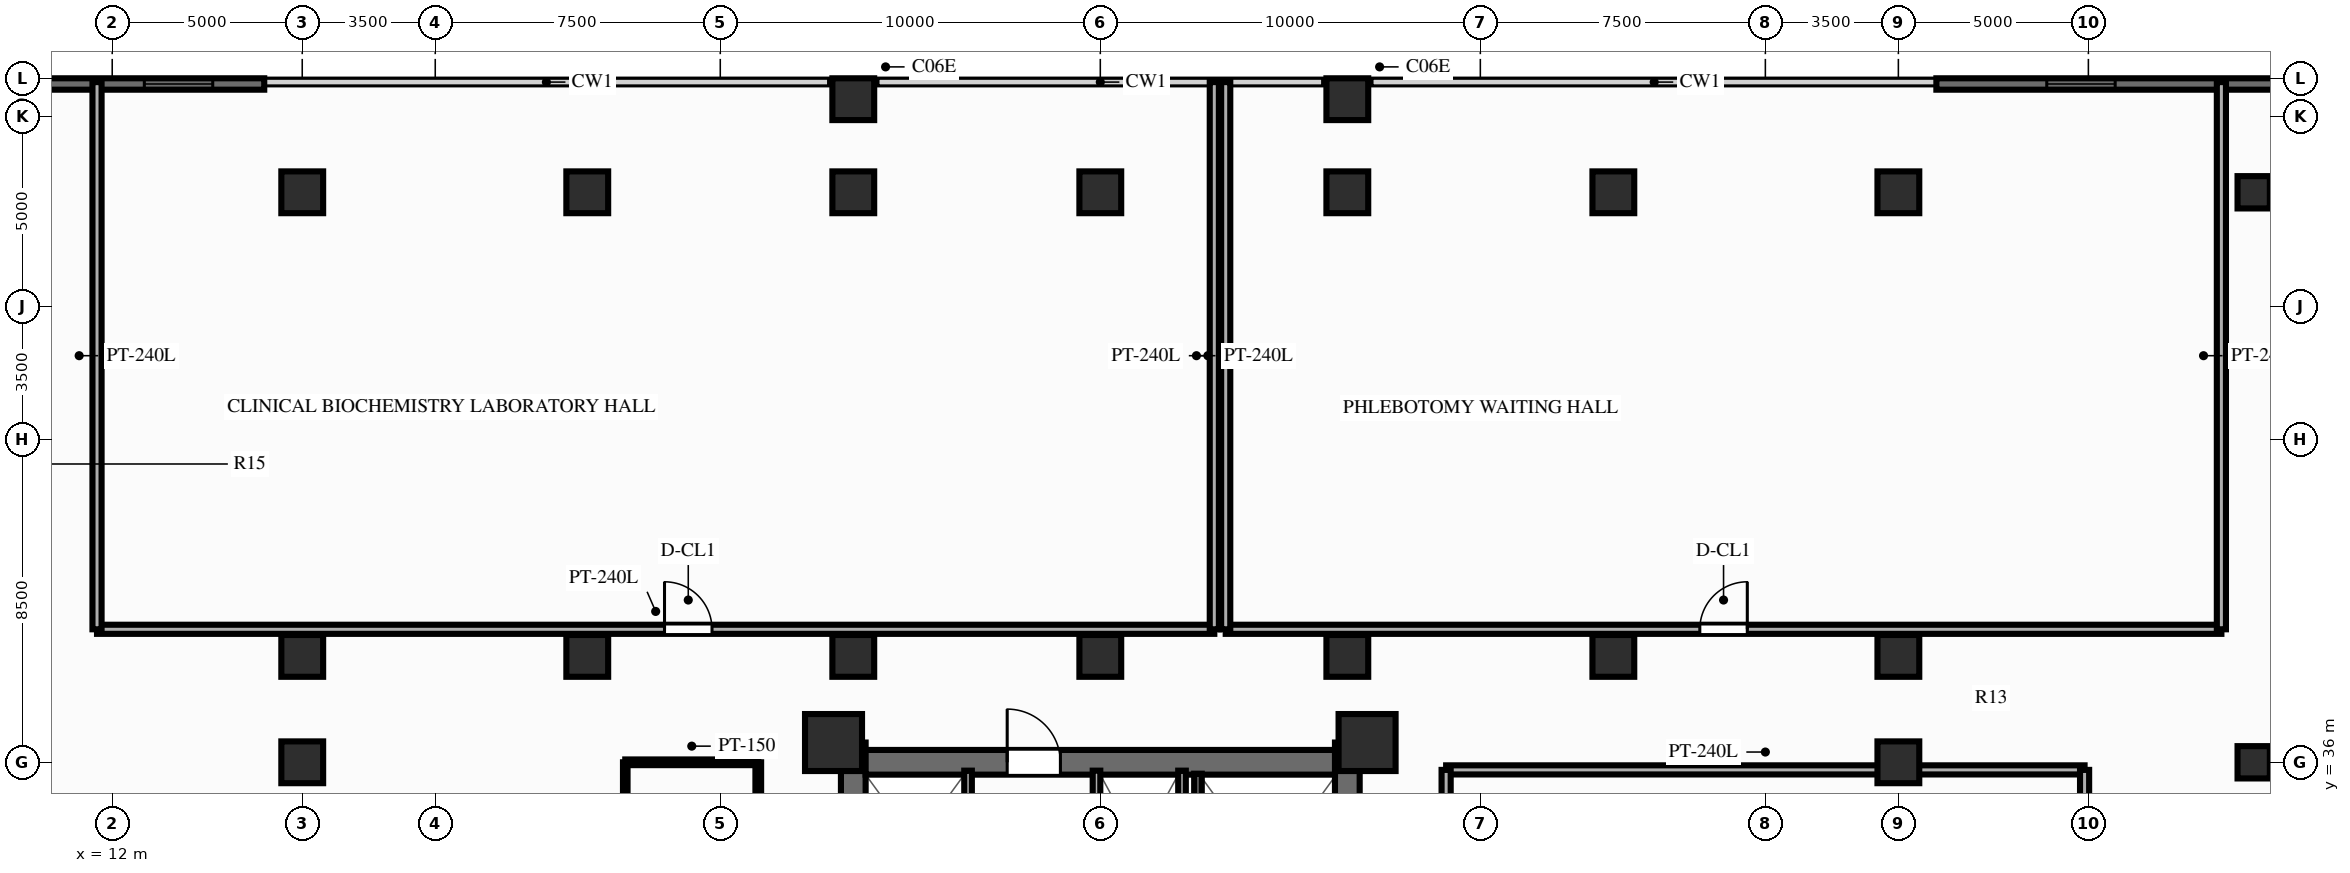
"""IFC4 building model, lengths in metres.
Left out: names, types, materials, properties, quantities, classifications, styles, units other than length and angle.
Written with IfcOpenShell. Run it as: python <this file> out.ifc"""

import sys

from ifc_helpers import new_model, si_unit, direction, frame, frame_2d, origin, origin_2d, place, context, subcontext, project, spatial, rectangle, circle, extrude, source, transform, mapped, element, fill, save


model = new_model("IFC4")
c1 = context("Model", 3, precision=1e-05, world=origin(), true_north=direction((0.0, 1.0)))
c2 = subcontext(c1, "Body", "Model", "MODEL_VIEW")
j1 = project(units=[si_unit("LENGTHUNIT", "METRE"), si_unit("PLANEANGLEUNIT", "RADIAN")], contexts=[c1])
p1 = place(None, origin())
s1 = spatial("IfcSite", under=j1, at=p1, CompositionType="ELEMENT")
p2 = place(p1, origin())
s2 = spatial("IfcBuilding", under=s1, at=p2, CompositionType="ELEMENT")
p3 = place(p2, frame((0.0, 0.0, 7.8)))
s3 = spatial("IfcBuildingStorey", under=s2, at=p3, CompositionType="ELEMENT", Elevation=7.8)
p4 = place(p3, frame((31.5, 17.48, 0.0), z_axis=(0.0, 0.0, 1.0), x_axis=(0.0, 1.0, 0.0)))
e1 = element("IfcWall", 1, at=p4, inside=s3, PredefinedType="SHEAR", context=c2, shape_type="SweptSolid", body=[
    extrude(rectangle(XDim=19.04, YDim=0.65, at=frame_2d((9.52, 0.0))), origin(), (0.0, 0.0, 1.0), 3.6),
])
p5 = place(p4, frame((6.32, 0.0, 0.0)))
e2 = element("IfcOpeningElement", 2, at=p5, cuts=e1, PredefinedType="OPENING", context=c2, shape_type="SweptSolid", body=[
    extrude(rectangle(XDim=1.1, YDim=2.15, at=frame_2d((0.55, 1.075))), frame((0.0, 0.337, 0.0), z_axis=(0.0, -1.0, 0.0), x_axis=(1.0, 0.0, 0.0)), (0.0, 0.0, 1.0), 0.674),
])
p6 = place(p3, frame((44.5, 17.48, 0.0), z_axis=(0.0, 0.0, 1.0), x_axis=(0.0, 1.0, 0.0)))
e3 = element("IfcWall", 3, at=p6, inside=s3, PredefinedType="SHEAR", context=c2, shape_type="SweptSolid", body=[
    extrude(rectangle(XDim=19.04, YDim=0.65, at=frame_2d((9.52, 0.0))), origin(), (0.0, 0.0, 1.0), 3.6),
])
p7 = place(p6, frame((12.67, 0.0, 0.0), z_axis=(0.0, 0.0, 1.0), x_axis=(-1.0, 0.0, 0.0)))
e4 = element("IfcOpeningElement", 4, at=p7, cuts=e3, PredefinedType="OPENING", context=c2, shape_type="SweptSolid", body=[
    extrude(rectangle(XDim=1.1, YDim=2.15, at=frame_2d((0.55, 1.075))), frame((0.0, 0.337, 0.0), z_axis=(0.0, -1.0, 0.0), x_axis=(1.0, 0.0, 0.0)), (0.0, 0.0, 1.0), 0.674),
])
p8 = place(p3, frame((31.825, 36.0, 0.0), z_axis=(0.0, 0.0, 1.0), x_axis=(1.0, 0.0, 0.0)))
e5 = element("IfcWall", 5, at=p8, inside=s3, PredefinedType="SHEAR", context=c2, shape_type="SweptSolid", body=[
    extrude(rectangle(XDim=12.35, YDim=0.65, at=frame_2d((6.175, 0.0))), origin(), (0.0, 0.0, 1.0), 3.6),
])
p9 = place(p8, frame((5.125, 0.0, 0.0), z_axis=(0.0, 0.0, 1.0), x_axis=(-1.0, 0.0, 0.0)))
e6 = element("IfcOpeningElement", 6, at=p9, cuts=e5, PredefinedType="OPENING", context=c2, shape_type="SweptSolid", body=[
    extrude(rectangle(XDim=1.4, YDim=2.15, at=frame_2d((0.7, 1.075))), frame((0.0, 0.337, 0.0), z_axis=(0.0, -1.0, 0.0), x_axis=(1.0, 0.0, 0.0)), (0.0, 0.0, 1.0), 0.674),
])
m1 = source(origin(), c2, "Body", "SweptSolid", [
    extrude(rectangle(XDim=1.5, YDim=1.5, at=origin_2d()), origin(), (0.0, 0.0, 1.0), 3.6),
])
for number, where, z_axis, x_axis in (
    (7, (30.98, 36.52, 0.0), (0.0, 0.0, 1.0), (1.0, 0.0, 0.0)),
    (8, (45.02, 36.52, 0.0), (0.0, 0.0, 1.0), (1.0, 0.0, 0.0)),
):
    element("IfcColumn", number, at=place(p3, frame(where, z_axis=z_axis, x_axis=x_axis)), inside=s3, PredefinedType="COLUMN", context=c2, shape_type="MappedRepresentation", body=[
        mapped(m1, transform((0.0, 0.0, 0.0), scale=1.0)),
    ])
m2 = source(origin(), c2, "Body", "SweptSolid", [
    extrude(circle(Radius=0.425, at=origin_2d()), origin(), (0.0, 0.0, 1.0), 3.6),
])
for number, where, z_axis, x_axis in (
    (9, (68.35, 36.0, 0.0), (0.0, 0.0, 1.0), (1.0, 0.0, 0.0)),
    (10, (68.35, 51.0, 0.0), (0.0, 0.0, 1.0), (1.0, 0.0, 0.0)),
):
    element("IfcColumn", number, at=place(p3, frame(where, z_axis=z_axis, x_axis=x_axis)), inside=s3, PredefinedType="COLUMN", context=c2, shape_type="MappedRepresentation", body=[
        mapped(m2, transform((0.0, 0.0, 0.0), scale=1.0)),
    ])
m3 = source(origin(), c2, "Body", "SweptSolid", [
    extrude(rectangle(XDim=1.1, YDim=1.1, at=origin_2d()), origin(), (0.0, 0.0, 1.0), 3.6),
])
for number, where, z_axis, x_axis in (
    (11, (17.0, 36.0, 0.0), (0.0, 0.0, 1.0), (1.0, 0.0, 0.0)),
    (12, (59.0, 36.0, 0.0), (0.0, 0.0, 1.0), (1.0, 0.0, 0.0)),
    (13, (17.0, 38.8, 0.0), (0.0, 0.0, 1.0), (1.0, 0.0, 0.0)),
    (14, (59.0, 38.8, 0.0), (0.0, 0.0, 1.0), (1.0, 0.0, 0.0)),
    (15, (17.0, 51.0, 0.0), (0.0, 0.0, 1.0), (1.0, 0.0, 0.0)),
    (16, (59.0, 51.0, 0.0), (0.0, 0.0, 1.0), (1.0, 0.0, 0.0)),
    (17, (24.5, 38.8, 0.0), (0.0, 0.0, 1.0), (1.0, 0.0, 0.0)),
    (18, (24.5, 51.0, 0.0), (0.0, 0.0, 1.0), (1.0, 0.0, 0.0)),
    (19, (31.5, 38.8, 0.0), (0.0, 0.0, 1.0), (1.0, 0.0, 0.0)),
    (20, (31.5, 51.0, 0.0), (0.0, 0.0, 1.0), (1.0, 0.0, 0.0)),
    (21, (31.5, 53.45, 0.0), (0.0, 0.0, 1.0), (1.0, 0.0, 0.0)),
    (22, (38.0, 38.8, 0.0), (0.0, 0.0, 1.0), (1.0, 0.0, 0.0)),
    (23, (38.0, 51.0, 0.0), (0.0, 0.0, 1.0), (1.0, 0.0, 0.0)),
    (24, (44.5, 38.8, 0.0), (0.0, 0.0, 1.0), (1.0, 0.0, 0.0)),
    (25, (44.5, 51.0, 0.0), (0.0, 0.0, 1.0), (1.0, 0.0, 0.0)),
    (26, (44.5, 53.45, 0.0), (0.0, 0.0, 1.0), (1.0, 0.0, 0.0)),
    (27, (51.5, 38.8, 0.0), (0.0, 0.0, 1.0), (1.0, 0.0, 0.0)),
    (28, (51.5, 51.0, 0.0), (0.0, 0.0, 1.0), (1.0, 0.0, 0.0)),
):
    element("IfcColumn", number, at=place(p3, frame(where, z_axis=z_axis, x_axis=x_axis)), inside=s3, PredefinedType="COLUMN", context=c2, shape_type="MappedRepresentation", body=[
        mapped(m3, transform((0.0, 0.0, 0.0), scale=1.0)),
    ])
p10 = place(p3, frame((0.0, 53.85, 0.0), z_axis=(0.0, 0.0, 1.0), x_axis=(1.0, 0.0, 0.0)))
e29 = element("IfcWall", 29, at=p10, inside=s3, PredefinedType="SOLIDWALL", context=c2, shape_type="SweptSolid", body=[
    extrude(rectangle(XDim=16.0, YDim=0.3, at=frame_2d((8.0, 0.0))), origin(), (0.0, 0.0, 1.0), 2.88),
])
p11 = place(p10, frame((4.955, 0.0, 0.85)))
e30 = element("IfcOpeningElement", 30, at=p11, cuts=e29, PredefinedType="OPENING", context=c2, shape_type="SweptSolid", body=[
    extrude(rectangle(XDim=1.8, YDim=1.65, at=frame_2d((0.9, 0.825))), frame((0.0, 0.162, 0.0), z_axis=(0.0, -1.0, 0.0), x_axis=(1.0, 0.0, 0.0)), (0.0, 0.0, 1.0), 0.324),
])
p12 = place(p10, frame((12.845, 0.0, 0.85)))
e31 = element("IfcOpeningElement", 31, at=p12, cuts=e29, PredefinedType="OPENING", context=c2, shape_type="SweptSolid", body=[
    extrude(rectangle(XDim=1.8, YDim=1.65, at=frame_2d((0.9, 0.825))), frame((0.0, 0.162, 0.0), z_axis=(0.0, -1.0, 0.0), x_axis=(1.0, 0.0, 0.0)), (0.0, 0.0, 1.0), 0.324),
])
p13 = place(p3, frame((60.0, 53.85, 0.0), z_axis=(0.0, 0.0, 1.0), x_axis=(1.0, 0.0, 0.0)))
e32 = element("IfcWall", 32, at=p13, inside=s3, PredefinedType="SOLIDWALL", context=c2, shape_type="SweptSolid", body=[
    extrude(rectangle(XDim=16.0, YDim=0.3, at=frame_2d((8.0, 0.0))), origin(), (0.0, 0.0, 1.0), 2.88),
])
p14 = place(p13, frame((2.905, 0.0, 0.85)))
e33 = element("IfcOpeningElement", 33, at=p14, cuts=e32, PredefinedType="OPENING", context=c2, shape_type="SweptSolid", body=[
    extrude(rectangle(XDim=1.8, YDim=1.65, at=frame_2d((0.9, 0.825))), frame((0.0, 0.162, 0.0), z_axis=(0.0, -1.0, 0.0), x_axis=(1.0, 0.0, 0.0)), (0.0, 0.0, 1.0), 0.324),
])
p15 = place(p13, frame((10.795, 0.0, 0.85)))
e34 = element("IfcOpeningElement", 34, at=p15, cuts=e32, PredefinedType="OPENING", context=c2, shape_type="SweptSolid", body=[
    extrude(rectangle(XDim=1.8, YDim=1.65, at=frame_2d((0.9, 0.825))), frame((0.0, 0.162, 0.0), z_axis=(0.0, -1.0, 0.0), x_axis=(1.0, 0.0, 0.0)), (0.0, 0.0, 1.0), 0.324),
])
p16 = place(p3, frame((40.15, 31.8, 0.0), z_axis=(0.0, 0.0, 1.0), x_axis=(0.0, 1.0, 0.0)))
e35 = element("IfcWall", 35, at=p16, inside=s3, PredefinedType="PARTITIONING", context=c2, shape_type="SweptSolid", body=[
    extrude(rectangle(XDim=3.98, YDim=0.2, at=frame_2d((1.99, 0.0))), origin(), (0.0, 0.0, 1.0), 3.32),
])
p17 = place(p3, frame((40.57, 28.65, 0.0), z_axis=(0.0, 0.0, 1.0), x_axis=(0.0, 1.0, 0.0)))
e36 = element("IfcWall", 36, at=p17, inside=s3, PredefinedType="SOLIDWALL", context=c2, shape_type="SweptSolid", body=[
    extrude(rectangle(XDim=7.05, YDim=0.2, at=frame_2d((3.525, 0.0))), origin(), (0.0, 0.0, 1.0), 3.32),
])
p18 = place(p3, frame((34.52, 25.44, 0.0), z_axis=(0.0, 0.0, 1.0), x_axis=(0.0, 1.0, 0.0)))
e37 = element("IfcWall", 37, at=p18, inside=s3, PredefinedType="PARTITIONING", context=c2, shape_type="SweptSolid", body=[
    extrude(rectangle(XDim=10.34, YDim=0.2, at=frame_2d((5.17, 0.0))), origin(), (0.0, 0.0, 1.0), 3.32),
])
p19 = place(p18, frame((0.32, 0.0, 0.0)))
e38 = element("IfcOpeningElement", 38, at=p19, cuts=e37, PredefinedType="OPENING", context=c2, shape_type="SweptSolid", body=[
    extrude(rectangle(XDim=1.0, YDim=2.15, at=frame_2d((0.5, 1.075))), frame((0.0, 0.112, 0.0), z_axis=(0.0, -1.0, 0.0), x_axis=(1.0, 0.0, 0.0)), (0.0, 0.0, 1.0), 0.224),
])
p20 = place(p18, frame((1.71, 0.0, 0.0)))
e39 = element("IfcOpeningElement", 39, at=p20, cuts=e37, PredefinedType="OPENING", context=c2, shape_type="SweptSolid", body=[
    extrude(rectangle(XDim=1.0, YDim=2.15, at=frame_2d((0.5, 1.075))), frame((0.0, 0.112, 0.0), z_axis=(0.0, -1.0, 0.0), x_axis=(1.0, 0.0, 0.0)), (0.0, 0.0, 1.0), 0.224),
])
p21 = place(p18, frame((3.535, 0.0, 0.0)))
e40 = element("IfcOpeningElement", 40, at=p21, cuts=e37, PredefinedType="OPENING", context=c2, shape_type="SweptSolid", body=[
    extrude(rectangle(XDim=1.0, YDim=2.15, at=frame_2d((0.5, 1.075))), frame((0.0, 0.112, 0.0), z_axis=(0.0, -1.0, 0.0), x_axis=(1.0, 0.0, 0.0)), (0.0, 0.0, 1.0), 0.224),
])
p22 = place(p18, frame((5.135, 0.0, 0.0)))
e41 = element("IfcOpeningElement", 41, at=p22, cuts=e37, PredefinedType="OPENING", context=c2, shape_type="SweptSolid", body=[
    extrude(rectangle(XDim=1.0, YDim=2.15, at=frame_2d((0.5, 1.075))), frame((0.0, 0.112, 0.0), z_axis=(0.0, -1.0, 0.0), x_axis=(1.0, 0.0, 0.0)), (0.0, 0.0, 1.0), 0.224),
])
p23 = place(p3, frame((37.9, 25.44, 0.0), z_axis=(0.0, 0.0, 1.0), x_axis=(0.0, 1.0, 0.0)))
e42 = element("IfcWall", 42, at=p23, inside=s3, PredefinedType="PARTITIONING", context=c2, shape_type="SweptSolid", body=[
    extrude(rectangle(XDim=10.34, YDim=0.2, at=frame_2d((5.17, 0.0))), origin(), (0.0, 0.0, 1.0), 3.32),
])
p24 = place(p3, frame((25.5, 18.0, 0.0), z_axis=(0.0, 0.0, 1.0), x_axis=(0.0, 1.0, 0.0)))
e43 = element("IfcWall", 43, at=p24, inside=s3, PredefinedType="PARTITIONING", context=c2, shape_type="SweptSolid", body=[
    extrude(rectangle(XDim=18.0, YDim=0.12, at=frame_2d((9.0, 0.0))), origin(), (0.0, 0.0, 1.0), 3.32),
])
p25 = place(p3, frame((29.0, 29.7, 0.0), z_axis=(0.0, 0.0, 1.0), x_axis=(0.0, 1.0, 0.0)))
e44 = element("IfcWall", 44, at=p25, inside=s3, PredefinedType="PARTITIONING", context=c2, shape_type="SweptSolid", body=[
    extrude(rectangle(XDim=6.3, YDim=0.15, at=frame_2d((3.15, 0.0))), origin(), (0.0, 0.0, 1.0), 3.32),
])
p26 = place(p25, frame((2.75, 0.0, 0.0)))
e45 = element("IfcOpeningElement", 45, at=p26, cuts=e44, PredefinedType="OPENING", context=c2, shape_type="SweptSolid", body=[
    extrude(rectangle(XDim=0.8, YDim=2.05, at=frame_2d((0.4, 1.025))), frame((0.0, 0.087, 0.0), z_axis=(0.0, -1.0, 0.0), x_axis=(1.0, 0.0, 0.0)), (0.0, 0.0, 1.0), 0.174),
])
p27 = place(p3, frame((25.5, 36.0, 0.0), z_axis=(0.0, 0.0, 1.0), x_axis=(1.0, 0.0, 0.0)))
e46 = element("IfcWall", 46, at=p27, inside=s3, PredefinedType="PARTITIONING", context=c2, shape_type="SweptSolid", body=[
    extrude(rectangle(XDim=3.5, YDim=0.15, at=frame_2d((1.75, 0.0))), origin(), (0.0, 0.0, 1.0), 2.69),
])
p28 = place(p3, frame((11.6, 39.5, 0.0), z_axis=(0.0, 0.0, 1.0), x_axis=(1.0, 0.0, 0.0)))
e47 = element("IfcWall", 47, at=p28, inside=s3, PredefinedType="PARTITIONING", context=c2, shape_type="SweptSolid", body=[
    extrude(rectangle(XDim=29.4, YDim=0.24, at=frame_2d((14.7, 0.0))), origin(), (0.0, 0.0, 1.0), 3.32),
])
p29 = place(p28, frame((14.933, 0.0, 0.0)))
e48 = element("IfcOpeningElement", 48, at=p29, cuts=e47, PredefinedType="OPENING", context=c2, shape_type="SweptSolid", body=[
    extrude(rectangle(XDim=1.25, YDim=2.15, at=frame_2d((0.625, 1.075))), frame((0.0, 0.132, 0.0), z_axis=(0.0, -1.0, 0.0), x_axis=(1.0, 0.0, 0.0)), (0.0, 0.0, 1.0), 0.264),
])
for number, where, z_axis, x_axis in (
    (49, (11.6, 39.5, 0.0), (0.0, 0.0, 1.0), (0.0, 1.0, 0.0)),
    (50, (41.0, 39.5, 0.0), (0.0, 0.0, 1.0), (0.0, 1.0, 0.0)),
):
    element("IfcWall", number, at=place(p3, frame(where, z_axis=z_axis, x_axis=x_axis)), inside=s3, PredefinedType="PARTITIONING", context=c2, shape_type="SweptSolid", body=[
        extrude(rectangle(XDim=14.4, YDim=0.24, at=frame_2d((7.2, 0.0))), origin(), (0.0, 0.0, 1.0), 3.32),
    ])
p30 = place(p3, frame((41.3, 39.5, 0.0), z_axis=(0.0, 0.0, 1.0), x_axis=(1.0, 0.0, 0.0)))
e51 = element("IfcWall", 51, at=p30, inside=s3, PredefinedType="PARTITIONING", context=c2, shape_type="SweptSolid", body=[
    extrude(rectangle(XDim=26.2, YDim=0.24, at=frame_2d((13.1, 0.0))), origin(), (0.0, 0.0, 1.0), 3.32),
])
p31 = place(p30, frame((12.475, 0.0, 0.0)))
e52 = element("IfcOpeningElement", 52, at=p31, cuts=e51, PredefinedType="OPENING", context=c2, shape_type="SweptSolid", body=[
    extrude(rectangle(XDim=1.25, YDim=2.15, at=frame_2d((0.625, 1.075))), frame((0.0, 0.132, 0.0), z_axis=(0.0, -1.0, 0.0), x_axis=(1.0, 0.0, 0.0)), (0.0, 0.0, 1.0), 0.264),
])
for number, where, z_axis, x_axis in (
    (53, (41.3, 39.5, 0.0), (0.0, 0.0, 1.0), (0.0, 1.0, 0.0)),
    (54, (67.5, 39.5, 0.0), (0.0, 0.0, 1.0), (0.0, 1.0, 0.0)),
):
    element("IfcWall", number, at=place(p3, frame(where, z_axis=z_axis, x_axis=x_axis)), inside=s3, PredefinedType="PARTITIONING", context=c2, shape_type="SweptSolid", body=[
        extrude(rectangle(XDim=14.4, YDim=0.24, at=frame_2d((7.2, 0.0))), origin(), (0.0, 0.0, 1.0), 3.32),
    ])
p32 = place(p3, frame((47.1, 35.8, 0.0), z_axis=(0.0, 0.0, 1.0), x_axis=(1.0, 0.0, 0.0)))
e55 = element("IfcWall", 55, at=p32, inside=s3, PredefinedType="PARTITIONING", context=c2, shape_type="SweptSolid", body=[
    extrude(rectangle(XDim=16.8, YDim=0.24, at=frame_2d((8.4, 0.0))), origin(), (0.0, 0.0, 1.0), 3.32),
])
p33 = place(p3, frame((47.1, 18.2, 0.0), z_axis=(0.0, 0.0, 1.0), x_axis=(0.0, 1.0, 0.0)))
e56 = element("IfcWall", 56, at=p33, inside=s3, PredefinedType="PARTITIONING", context=c2, shape_type="SweptSolid", body=[
    extrude(rectangle(XDim=17.6, YDim=0.24, at=frame_2d((8.8, 0.0))), origin(), (0.0, 0.0, 1.0), 3.32),
])
p34 = place(p3, frame((63.9, 18.2, 0.0), z_axis=(0.0, 0.0, 1.0), x_axis=(0.0, 1.0, 0.0)))
e57 = element("IfcWall", 57, at=p34, inside=s3, PredefinedType="PARTITIONING", context=c2, shape_type="SweptSolid", body=[
    extrude(rectangle(XDim=17.6, YDim=0.24, at=frame_2d((8.8, 0.0))), origin(), (0.0, 0.0, 1.0), 3.32),
])
p35 = place(p34, frame((7.686, 0.0, 0.0)))
e58 = element("IfcOpeningElement", 58, at=p35, cuts=e57, PredefinedType="OPENING", context=c2, shape_type="SweptSolid", body=[
    extrude(rectangle(XDim=1.25, YDim=2.15, at=frame_2d((0.625, 1.075))), frame((0.0, 0.132, 0.0), z_axis=(0.0, -1.0, 0.0), x_axis=(1.0, 0.0, 0.0)), (0.0, 0.0, 1.0), 0.264),
])
m4 = source(origin(), c2, "Body", "SweptSolid", [
    extrude(rectangle(XDim=1.8, YDim=1.65, at=frame_2d((0.9, 0.825))), frame((0.0, 0.03, 0.0), z_axis=(0.0, -1.0, 0.0), x_axis=(1.0, 0.0, 0.0)), (0.0, 0.0, 1.0), 0.06),
])
p36 = place(p12, origin())
e59 = element("IfcWindow", 59, at=p36, inside=s3, PartitioningType="SINGLE_PANEL", PredefinedType="WINDOW", context=c2, shape_type="MappedRepresentation", body=[
    mapped(m4, transform((0.0, 0.0, 0.0), scale=1.0)),
])
fill(e31, e59)
p37 = place(p14, origin())
e60 = element("IfcWindow", 60, at=p37, inside=s3, PartitioningType="SINGLE_PANEL", PredefinedType="WINDOW", context=c2, shape_type="MappedRepresentation", body=[
    mapped(m4, transform((0.0, 0.0, 0.0), scale=1.0)),
])
fill(e33, e60)
m5 = source(origin(), c2, "Body", "SweptSolid", [
    extrude(rectangle(XDim=1.4, YDim=2.15, at=frame_2d((0.7, 1.075))), frame((0.0, 0.025, 0.0), z_axis=(0.0, -1.0, 0.0), x_axis=(1.0, 0.0, 0.0)), (0.0, 0.0, 1.0), 0.05),
])
p38 = place(p9, origin())
e61 = element("IfcDoor", 61, at=p38, inside=s3, OperationType="SINGLE_SWING_RIGHT", PredefinedType="DOOR", context=c2, shape_type="MappedRepresentation", body=[
    mapped(m5, transform((0.0, 0.0, 0.0), scale=1.0)),
])
fill(e6, e61)
m6 = source(origin(), c2, "Body", "SweptSolid", [
    extrude(rectangle(XDim=1.25, YDim=2.15, at=frame_2d((0.625, 1.075))), frame((0.0, 0.025, 0.0), z_axis=(0.0, -1.0, 0.0), x_axis=(1.0, 0.0, 0.0)), (0.0, 0.0, 1.0), 0.05),
])
p39 = place(p29, origin())
e62 = element("IfcDoor", 62, at=p39, inside=s3, OperationType="SINGLE_SWING_LEFT", PredefinedType="DOOR", context=c2, shape_type="MappedRepresentation", body=[
    mapped(m6, transform((0.0, 0.0, 0.0), scale=1.0)),
])
fill(e48, e62)
p40 = place(p31, origin())
e63 = element("IfcDoor", 63, at=p40, inside=s3, OperationType="SINGLE_SWING_RIGHT", PredefinedType="DOOR", context=c2, shape_type="MappedRepresentation", body=[
    mapped(m6, transform((0.0, 0.0, 0.0), scale=1.0)),
])
fill(e52, e63)
save(model, sys.argv[1])
